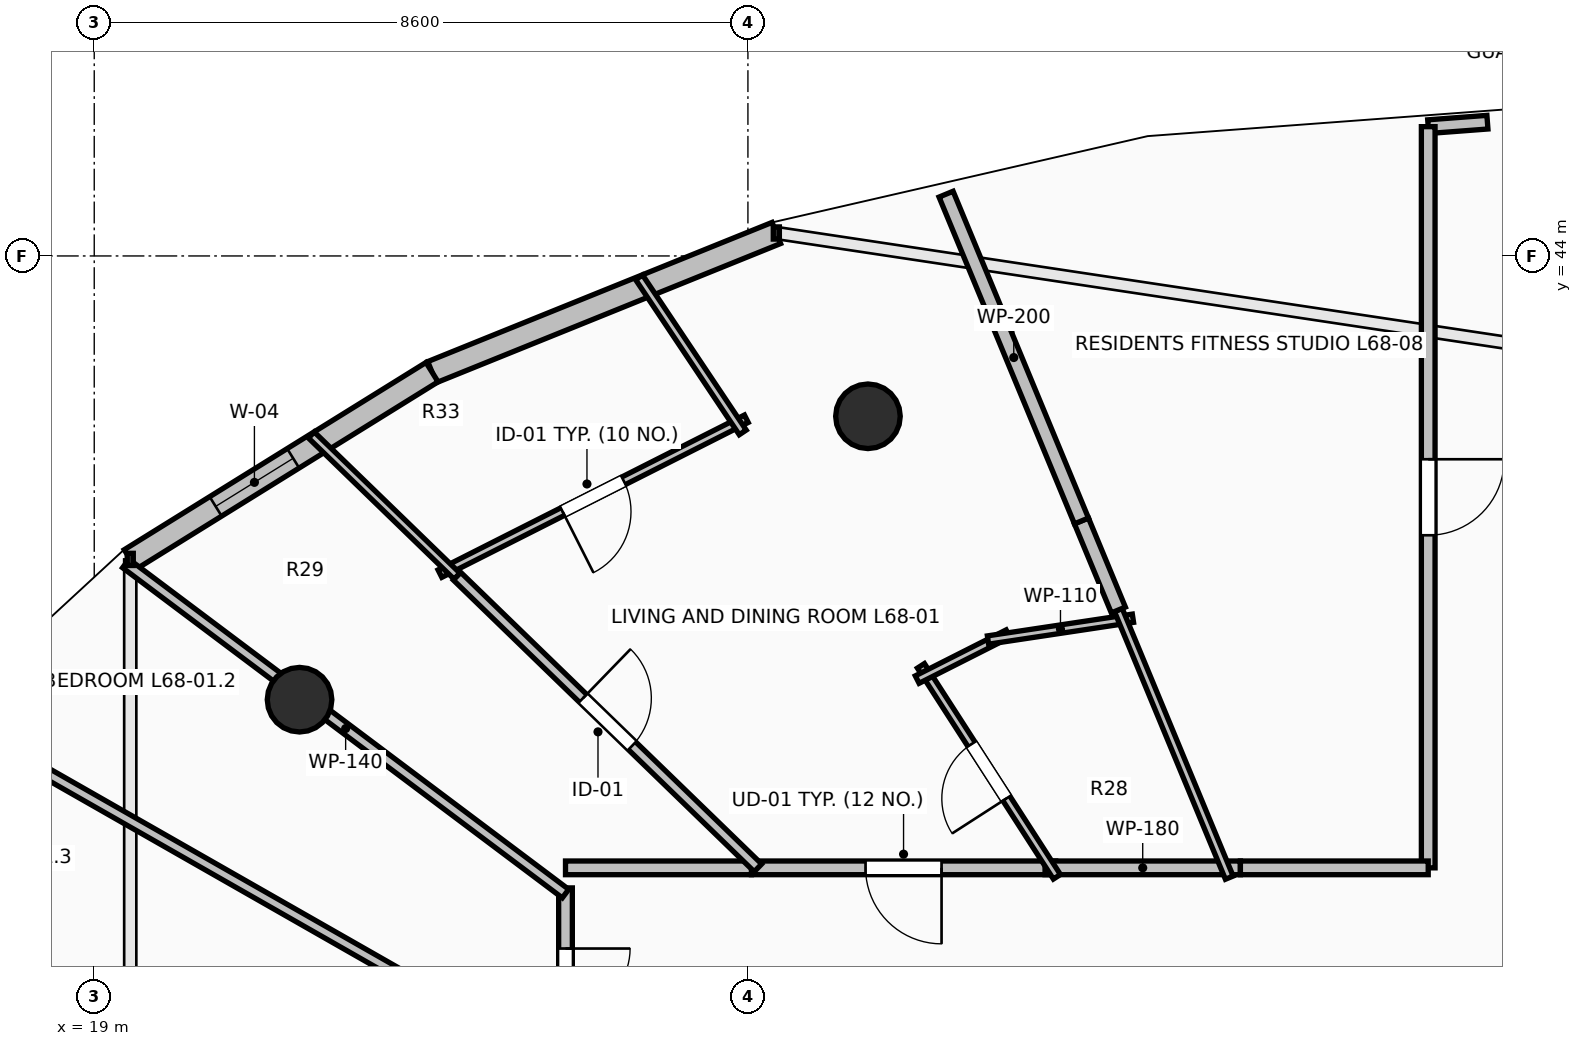
"""IFC4 building model, lengths in metres.
Left out: names, types, materials, properties, quantities, classifications, styles, units other than length and angle.
Written with IfcOpenShell. Run it as: python <this file> out.ifc"""

import sys

from ifc_helpers import new_model, si_unit, direction, frame, frame_2d, origin, origin_2d, place, context, subcontext, project, spatial, rectangle, circle, extrude, element, fill, save


model = new_model("IFC4")
c1 = context("Model", 3, precision=1e-05, world=origin(), true_north=direction((0.0, 1.0)))
c2 = subcontext(c1, "Body", "Model", "MODEL_VIEW")
j1 = project(units=[si_unit("LENGTHUNIT", "METRE"), si_unit("PLANEANGLEUNIT", "RADIAN")], contexts=[c1])
p1 = place(None, origin())
s1 = spatial("IfcSite", under=j1, at=p1, CompositionType="ELEMENT")
p2 = place(p1, origin())
s2 = spatial("IfcBuilding", under=s1, at=p2, CompositionType="ELEMENT")
p3 = place(p2, frame((0.0, 0.0, 252.0)))
s3 = spatial("IfcBuildingStorey", under=s2, at=p3, CompositionType="ELEMENT", Elevation=252.0)
for number, where, z_axis, x_axis in (
    (1, (29.179, 41.891, 0.0), (0.0, 0.0, 1.0), (-0.383, 0.924, 0.0)),
    (2, (21.701, 38.162, 0.0), (0.0, 0.0, 1.0), (-0.707, 0.707, 0.0)),
):
    element("IfcColumn", number, at=place(p3, frame(where, z_axis=z_axis, x_axis=x_axis)), inside=s3, PredefinedType="COLUMN", context=c2, shape_type="SweptSolid", body=[
        extrude(circle(Radius=0.425, at=origin_2d()), origin(), (0.0, 0.0, 1.0), 3.55),
    ])
p4 = place(p3, frame((27.974, 44.302, 0.0), z_axis=(0.0, 0.0, 1.0), x_axis=(-0.927147375511, -0.374696869594, 0.0)))
e3 = element("IfcWall", 3, at=p4, inside=s3, PredefinedType="STANDARD", context=c2, shape_type="SweptSolid", body=[
    extrude(rectangle(XDim=4.885, YDim=0.3, at=frame_2d((2.443, 0.0))), origin(), (0.0, 0.0, 1.0), 3.29),
])
p5 = place(p3, frame((23.444, 42.471, 0.0), z_axis=(0.0, 0.0, 1.0), x_axis=(-0.849702323036, -0.527262707032, 0.0)))
e4 = element("IfcWall", 4, at=p5, inside=s3, PredefinedType="STANDARD", context=c2, shape_type="SweptSolid", body=[
    extrude(rectangle(XDim=4.672, YDim=0.3, at=frame_2d((2.336, 0.0))), origin(), (0.0, 0.0, 1.0), 3.29),
])
p6 = place(p5, frame((2.15, 0.0, 0.85)))
e5 = element("IfcOpeningElement", 5, at=p6, cuts=e4, PredefinedType="OPENING", context=c2, shape_type="SweptSolid", body=[
    extrude(rectangle(XDim=1.2, YDim=1.95, at=frame_2d((0.6, 0.975))), frame((0.0, 0.165, 0.0), z_axis=(0.0, -1.0, 0.0), x_axis=(1.0, 0.0, 0.0)), (0.0, 0.0, 1.0), 0.33),
])
p7 = place(p3, frame((31.649, 35.95, 0.0), z_axis=(0.0, 0.0, 1.0), x_axis=(-1.0, 0.0, 0.0)))
e6 = element("IfcWall", 6, at=p7, inside=s3, PredefinedType="PARTITIONING", context=c2, shape_type="SweptSolid", body=[
    extrude(rectangle(XDim=4.003, YDim=0.18, at=frame_2d((2.001, 0.0))), origin(), (0.0, 0.0, 1.0), 2.482),
])
p8 = place(p7, frame((1.501, 0.0, 0.0)))
e7 = element("IfcOpeningElement", 7, at=p8, cuts=e6, PredefinedType="OPENING", context=c2, shape_type="SweptSolid", body=[
    extrude(rectangle(XDim=1.0, YDim=2.15, at=frame_2d((0.5, 1.075))), frame((0.0, 0.105, 0.0), z_axis=(0.0, -1.0, 0.0), x_axis=(1.0, 0.0, 0.0)), (0.0, 0.0, 1.0), 0.21),
])
p9 = place(p3, frame((34.079, 35.95, 0.0), z_axis=(0.0, 0.0, 1.0), x_axis=(-1.0, 0.0, 0.0)))
e8 = element("IfcWall", 8, at=p9, inside=s3, PredefinedType="PARTITIONING", context=c2, shape_type="SweptSolid", body=[
    extrude(rectangle(XDim=2.57, YDim=0.18, at=frame_2d((1.285, 0.0))), origin(), (0.0, 0.0, 1.0), 3.29),
])
p10 = place(p3, frame((27.646, 35.95, 0.0), z_axis=(0.0, 0.0, 1.0), x_axis=(-1.0, 0.0, 0.0)))
e9 = element("IfcWall", 9, at=p10, inside=s3, PredefinedType="PARTITIONING", context=c2, shape_type="SweptSolid", body=[
    extrude(rectangle(XDim=2.446, YDim=0.18, at=frame_2d((1.223, 0.0))), origin(), (0.0, 0.0, 1.0), 2.482),
])
p11 = place(p3, frame((25.2, 35.686, 0.0), z_axis=(0.0, 0.0, 1.0), x_axis=(0.0, -1.0, 0.0)))
e10 = element("IfcWall", 10, at=p11, inside=s3, PredefinedType="PARTITIONING", context=c2, shape_type="SweptSolid", body=[
    extrude(rectangle(XDim=2.445, YDim=0.18, at=frame_2d((1.223, 0.0))), origin(), (0.0, 0.0, 1.0), 2.482),
])
p12 = place(p11, frame((0.798, 0.0, 0.0)))
e11 = element("IfcOpeningElement", 11, at=p12, cuts=e10, PredefinedType="OPENING", context=c2, shape_type="SweptSolid", body=[
    extrude(rectangle(XDim=0.85, YDim=2.1, at=frame_2d((0.425, 1.05))), frame((0.0, 0.105, 0.0), z_axis=(0.0, -1.0, 0.0), x_axis=(1.0, 0.0, 0.0)), (0.0, 0.0, 1.0), 0.21),
])
p13 = place(p3, frame((37.329, 45.76, 0.0), z_axis=(0.0, 0.0, 1.0), x_axis=(-0.997136622012, -0.0756211415, 0.0)))
e12 = element("IfcWall", 12, at=p13, inside=s3, PredefinedType="PARTITIONING", context=c2, shape_type="SweptSolid", body=[
    extrude(rectangle(XDim=0.781, YDim=0.18, at=frame_2d((0.391, 0.0))), origin(), (0.0, 0.0, 1.0), 3.29),
])
p14 = place(p3, frame((36.55, 45.701, 0.0), z_axis=(0.0, 0.0, 1.0), x_axis=(0.0, -1.0, 0.0)))
e13 = element("IfcWall", 13, at=p14, inside=s3, PredefinedType="PARTITIONING", context=c2, shape_type="SweptSolid", body=[
    extrude(rectangle(XDim=9.751, YDim=0.18, at=frame_2d((4.875, 0.0))), origin(), (0.0, 0.0, 1.0), 2.482),
])
p15 = place(p14, frame((4.375, 0.0, 0.0)))
e14 = element("IfcOpeningElement", 14, at=p15, cuts=e13, PredefinedType="OPENING", context=c2, shape_type="SweptSolid", body=[
    extrude(rectangle(XDim=1.0, YDim=2.15, at=frame_2d((0.5, 1.075))), frame((0.0, 0.105, 0.0), z_axis=(0.0, -1.0, 0.0), x_axis=(1.0, 0.0, 0.0)), (0.0, 0.0, 1.0), 0.21),
])
p16 = place(p3, frame((36.55, 35.95, 0.0), z_axis=(0.0, 0.0, 1.0), x_axis=(-1.0, 0.0, 0.0)))
e15 = element("IfcWall", 15, at=p16, inside=s3, PredefinedType="PARTITIONING", context=c2, shape_type="SweptSolid", body=[
    extrude(rectangle(XDim=2.471, YDim=0.18, at=frame_2d((1.235, 0.0))), origin(), (0.0, 0.0, 1.0), 3.022),
])
p17 = place(p3, frame((31.665, 35.832, 0.0), z_axis=(0.0, 0.0, 1.0), x_axis=(-0.54169901175, 0.840572531474, 0.0)))
e16 = element("IfcWall", 16, at=p17, inside=s3, PredefinedType="PARTITIONING", context=c2, shape_type="SweptSolid", body=[
    extrude(rectangle(XDim=3.302, YDim=0.11, at=frame_2d((1.651, 0.0))), origin(), (0.0, 0.0, 1.0), 2.482),
])
p18 = place(p17, frame((1.226, 0.0, 0.0)))
e17 = element("IfcOpeningElement", 17, at=p18, cuts=e16, PredefinedType="OPENING", context=c2, shape_type="SweptSolid", body=[
    extrude(rectangle(XDim=0.85, YDim=2.1, at=frame_2d((0.425, 1.05))), frame((0.0, 0.07, 0.0), z_axis=(0.0, -1.0, 0.0), x_axis=(1.0, 0.0, 0.0)), (0.0, 0.0, 1.0), 0.14),
])
p19 = place(p3, frame((29.827, 38.427, 0.0), z_axis=(0.0, 0.0, 1.0), x_axis=(0.892302210035, 0.451438551706, 0.0)))
e18 = element("IfcWall", 18, at=p19, inside=s3, PredefinedType="PARTITIONING", context=c2, shape_type="SweptSolid", body=[
    extrude(rectangle(XDim=1.339, YDim=0.11, at=frame_2d((0.669, 0.0))), origin(), (0.0, 0.0, 1.0), 2.972),
])
p20 = place(p3, frame((30.759, 38.947, 0.0), z_axis=(0.0, 0.0, 1.0), x_axis=(0.988889867338, 0.148650026153, 0.0)))
e19 = element("IfcWall", 19, at=p20, inside=s3, PredefinedType="PARTITIONING", context=c2, shape_type="SweptSolid", body=[
    extrude(rectangle(XDim=1.928, YDim=0.11, at=frame_2d((0.964, 0.0))), origin(), (0.0, 0.0, 1.0), 2.972),
])
p21 = place(p3, frame((32.473, 39.342, 0.0), z_axis=(0.0, 0.0, 1.0), x_axis=(0.382813734438, -0.92382554886, 0.0)))
e20 = element("IfcWall", 20, at=p21, inside=s3, PredefinedType="PARTITIONING", context=c2, shape_type="SweptSolid", body=[
    extrude(rectangle(XDim=3.812, YDim=0.11, at=frame_2d((1.906, 0.0))), origin(), (0.0, 0.0, 1.0), 2.482),
])
p22 = place(p3, frame((27.579, 41.858, 0.0), z_axis=(0.0, 0.0, 1.0), x_axis=(-0.892472689139, -0.451101428883, 0.0)))
e21 = element("IfcWall", 21, at=p22, inside=s3, PredefinedType="PARTITIONING", context=c2, shape_type="SweptSolid", body=[
    extrude(rectangle(XDim=4.516, YDim=0.11, at=frame_2d((2.258, 0.0))), origin(), (0.0, 0.0, 1.0), 3.29),
])
p23 = place(p22, frame((1.808, 0.0, 0.0)))
e22 = element("IfcOpeningElement", 22, at=p23, cuts=e21, PredefinedType="OPENING", context=c2, shape_type="SweptSolid", body=[
    extrude(rectangle(XDim=0.9, YDim=2.1, at=frame_2d((0.45, 1.05))), frame((0.0, 0.07, 0.0), z_axis=(0.0, -1.0, 0.0), x_axis=(1.0, 0.0, 0.0)), (0.0, 0.0, 1.0), 0.14),
])
p24 = place(p3, frame((23.773, 39.787, 0.0), z_axis=(0.0, 0.0, 1.0), x_axis=(-0.718131661866, 0.695907261225, 0.0)))
e23 = element("IfcWall", 23, at=p24, inside=s3, PredefinedType="PARTITIONING", context=c2, shape_type="SweptSolid", body=[
    extrude(rectangle(XDim=2.669, YDim=0.11, at=frame_2d((1.335, 0.0))), origin(), (0.0, 0.0, 1.0), 3.29),
])
p25 = place(p3, frame((26.168, 43.719, 0.0), z_axis=(0.0, 0.0, 1.0), x_axis=(0.555733085272, -0.831360774835, 0.0)))
e24 = element("IfcWall", 24, at=p25, inside=s3, PredefinedType="PARTITIONING", context=c2, shape_type="SweptSolid", body=[
    extrude(rectangle(XDim=2.454, YDim=0.11, at=frame_2d((1.227, 0.0))), origin(), (0.0, 0.0, 1.0), 3.29),
])
p26 = place(p3, frame((23.773, 39.787, 0.0), z_axis=(0.0, 0.0, 1.0), x_axis=(0.718070058765, -0.695970826045, 0.0)))
e25 = element("IfcWall", 25, at=p26, inside=s3, PredefinedType="PARTITIONING", context=c2, shape_type="SweptSolid", body=[
    extrude(rectangle(XDim=5.513, YDim=0.14, at=frame_2d((2.756, 0.0))), origin(), (0.0, 0.0, 1.0), 2.482),
])
p27 = place(p26, frame((2.306, 0.0, 0.0)))
e26 = element("IfcOpeningElement", 26, at=p27, cuts=e25, PredefinedType="OPENING", context=c2, shape_type="SweptSolid", body=[
    extrude(rectangle(XDim=0.9, YDim=2.1, at=frame_2d((0.45, 1.05))), frame((0.0, 0.085, 0.0), z_axis=(0.0, -1.0, 0.0), x_axis=(1.0, 0.0, 0.0)), (0.0, 0.0, 1.0), 0.17),
])
p28 = place(p3, frame((32.473, 39.342, 0.0), z_axis=(0.0, 0.0, 1.0), x_axis=(-0.382714507304, 0.923866660238, 0.0)))
e27 = element("IfcWall", 27, at=p28, inside=s3, PredefinedType="PARTITIONING", context=c2, shape_type="SweptSolid", body=[
    extrude(rectangle(XDim=1.268, YDim=0.2, at=frame_2d((0.634, 0.0))), origin(), (0.0, 0.0, 1.0), 2.972),
])
p29 = place(p3, frame((31.988, 40.514, 0.0), z_axis=(0.0, 0.0, 1.0), x_axis=(-0.382733290986, 0.923858878818, 0.0)))
e28 = element("IfcWall", 28, at=p29, inside=s3, PredefinedType="PARTITIONING", context=c2, shape_type="SweptSolid", body=[
    extrude(rectangle(XDim=4.653, YDim=0.2, at=frame_2d((2.327, 0.0))), origin(), (0.0, 0.0, 1.0), 2.874),
])
p30 = place(p3, frame((19.415, 39.954, 0.0), z_axis=(0.0, 0.0, 1.0), x_axis=(0.799712355931, -0.600383334022, 0.0)))
e29 = element("IfcWall", 29, at=p30, inside=s3, PredefinedType="PARTITIONING", context=c2, shape_type="SweptSolid", body=[
    extrude(rectangle(XDim=7.234, YDim=0.14, at=frame_2d((3.617, 0.0))), origin(), (0.0, 0.0, 1.0), 2.482),
])
p31 = place(p3, frame((17.17, 37.881, 0.0), z_axis=(0.0, 0.0, 1.0), x_axis=(0.868639415668, -0.495444815844, 0.0)))
e30 = element("IfcWall", 30, at=p31, inside=s3, PredefinedType="PARTITIONING", context=c2, shape_type="SweptSolid", body=[
    extrude(rectangle(XDim=9.244, YDim=0.14, at=frame_2d((4.622, 0.0))), origin(), (0.0, 0.0, 1.0), 2.874),
])
p32 = place(p3, frame((15.133, 35.472, 0.0), z_axis=(0.0, 0.0, 1.0), x_axis=(0.923891232285, -0.382655185392, 0.0)))
e31 = element("IfcWall", 31, at=p32, inside=s3, PredefinedType="PARTITIONING", context=c2, shape_type="SweptSolid", body=[
    extrude(rectangle(XDim=5.07, YDim=0.2, at=frame_2d((2.535, 0.0))), origin(), (0.0, 0.0, 1.0), 2.874),
])
p33 = place(p6, origin())
e32 = element("IfcWindow", 32, at=p33, inside=s3, PartitioningType="SINGLE_PANEL", PredefinedType="WINDOW", context=c2, shape_type="SweptSolid", body=[
    extrude(rectangle(XDim=1.2, YDim=1.95, at=frame_2d((0.6, 0.975))), frame((0.0, 0.03, 0.0), z_axis=(0.0, -1.0, 0.0), x_axis=(1.0, 0.0, 0.0)), (0.0, 0.0, 1.0), 0.06),
])
fill(e5, e32)
p34 = place(p8, origin())
e33 = element("IfcDoor", 33, at=p34, inside=s3, OperationType="SINGLE_SWING_LEFT", PredefinedType="DOOR", context=c2, shape_type="SweptSolid", body=[
    extrude(rectangle(XDim=1.0, YDim=2.15, at=frame_2d((0.5, 1.075))), frame((0.0, 0.025, 0.0), z_axis=(0.0, -1.0, 0.0), x_axis=(1.0, 0.0, 0.0)), (0.0, 0.0, 1.0), 0.05),
])
fill(e7, e33)
p35 = place(p15, origin())
e34 = element("IfcDoor", 34, at=p35, inside=s3, OperationType="SINGLE_SWING_LEFT", PredefinedType="DOOR", context=c2, shape_type="SweptSolid", body=[
    extrude(rectangle(XDim=1.0, YDim=2.15, at=frame_2d((0.5, 1.075))), frame((0.0, 0.025, 0.0), z_axis=(0.0, -1.0, 0.0), x_axis=(1.0, 0.0, 0.0)), (0.0, 0.0, 1.0), 0.05),
])
fill(e14, e34)
p36 = place(p18, origin())
e35 = element("IfcDoor", 35, at=p36, inside=s3, OperationType="SINGLE_SWING_LEFT", PredefinedType="DOOR", context=c2, shape_type="SweptSolid", body=[
    extrude(rectangle(XDim=0.85, YDim=2.1, at=frame_2d((0.425, 1.05))), frame((0.0, 0.025, 0.0), z_axis=(0.0, -1.0, 0.0), x_axis=(1.0, 0.0, 0.0)), (0.0, 0.0, 1.0), 0.05),
])
fill(e17, e35)
p37 = place(p23, origin())
e36 = element("IfcDoor", 36, at=p37, inside=s3, OperationType="SINGLE_SWING_RIGHT", PredefinedType="DOOR", context=c2, shape_type="SweptSolid", body=[
    extrude(rectangle(XDim=0.9, YDim=2.1, at=frame_2d((0.45, 1.05))), frame((0.0, 0.025, 0.0), z_axis=(0.0, -1.0, 0.0), x_axis=(1.0, 0.0, 0.0)), (0.0, 0.0, 1.0), 0.05),
])
fill(e22, e36)
p38 = place(p27, origin())
e37 = element("IfcDoor", 37, at=p38, inside=s3, OperationType="SINGLE_SWING_LEFT", PredefinedType="DOOR", context=c2, shape_type="SweptSolid", body=[
    extrude(rectangle(XDim=0.9, YDim=2.1, at=frame_2d((0.45, 1.05))), frame((0.0, 0.025, 0.0), z_axis=(0.0, -1.0, 0.0), x_axis=(1.0, 0.0, 0.0)), (0.0, 0.0, 1.0), 0.05),
])
fill(e26, e37)
p39 = place(p12, origin())
e38 = element("IfcDoor", 38, at=p39, inside=s3, OperationType="SINGLE_SWING_LEFT", PredefinedType="DOOR", context=c2, shape_type="SweptSolid", body=[
    extrude(rectangle(XDim=0.85, YDim=2.1, at=frame_2d((0.425, 1.05))), frame((0.0, 0.025, 0.0), z_axis=(0.0, -1.0, 0.0), x_axis=(1.0, 0.0, 0.0)), (0.0, 0.0, 1.0), 0.05),
])
fill(e11, e38)
save(model, sys.argv[1])
